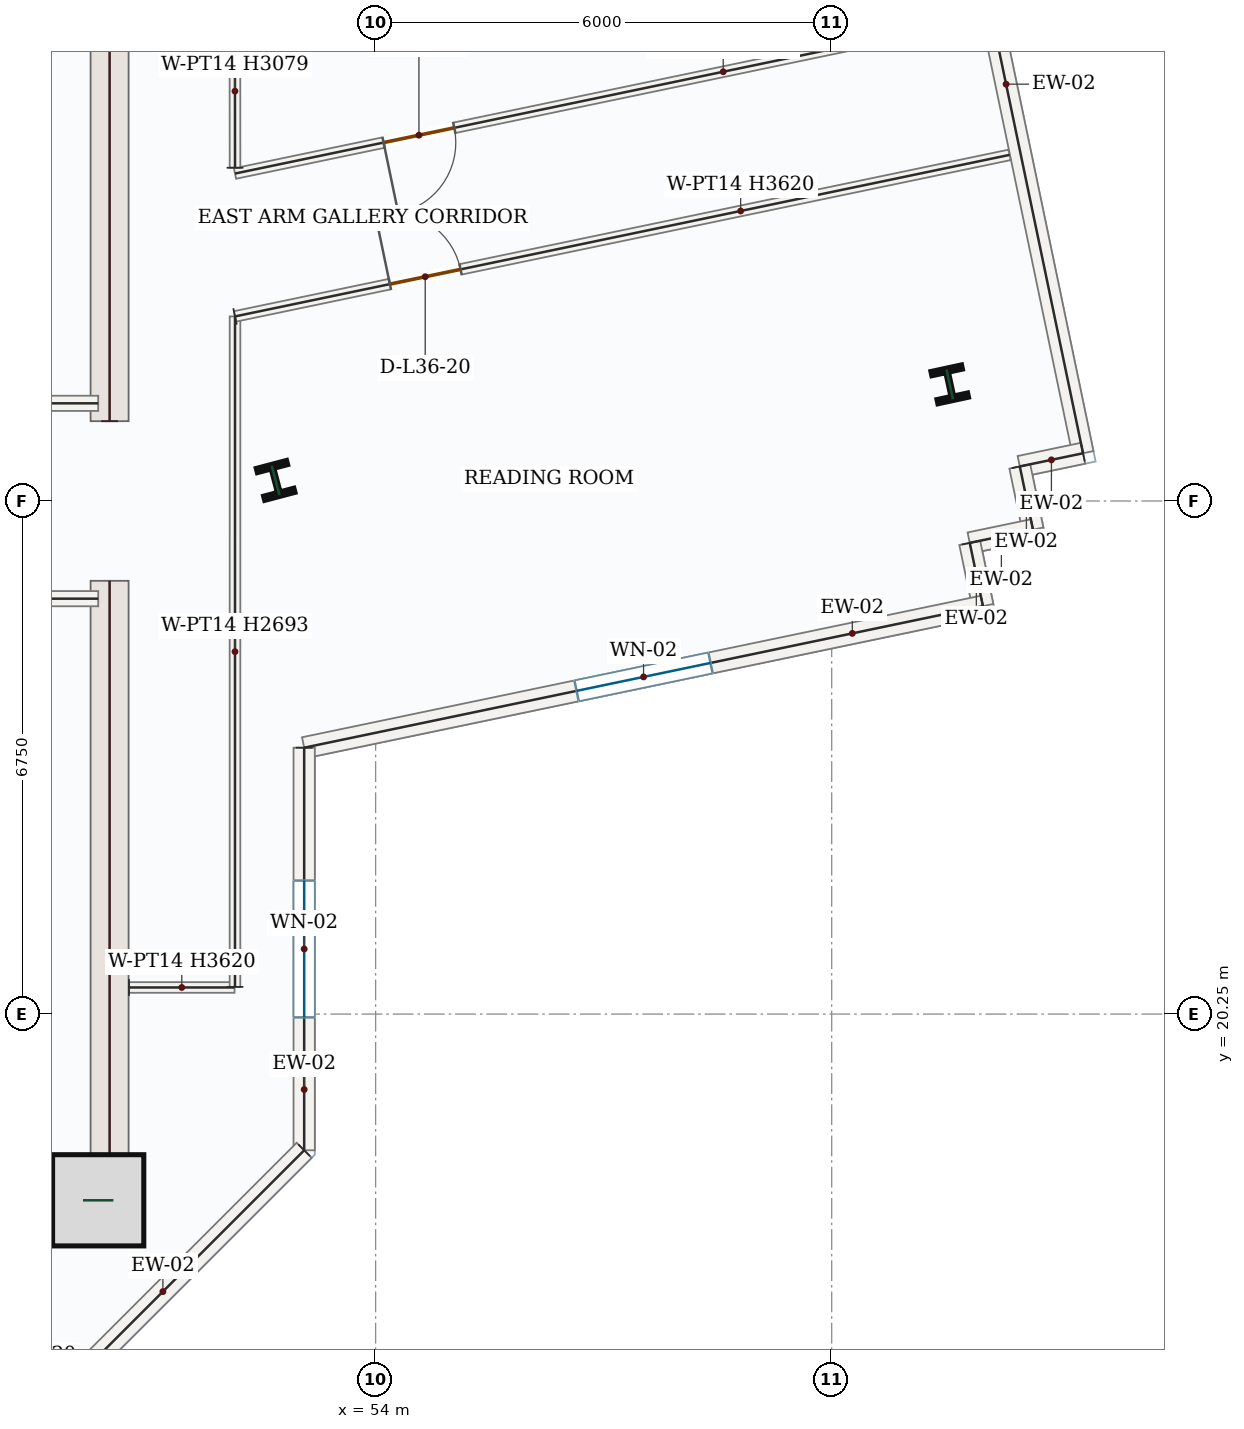
"""IFC4 building model, lengths in metres.
Left out: names, types, materials, properties, quantities, classifications, styles, units other than length and angle.
Written with IfcOpenShell. Run it as: python <this file> out.ifc"""

import sys

from ifc_helpers import new_model, si_unit, direction, frame, frame_2d, origin, origin_2d, place, context, subcontext, project, spatial, rectangle, i_section, extrude, source, transform, mapped, element, fill, save


model = new_model("IFC4")
c1 = context("Model", 3, precision=1e-05, world=origin(), true_north=direction((0.0, 1.0)))
c2 = subcontext(c1, "Body", "Model", "MODEL_VIEW")
j1 = project(units=[si_unit("LENGTHUNIT", "METRE"), si_unit("PLANEANGLEUNIT", "RADIAN")], contexts=[c1])
p1 = place(None, origin())
s1 = spatial("IfcSite", under=j1, at=p1, CompositionType="ELEMENT")
p2 = place(p1, origin())
s2 = spatial("IfcBuilding", under=s1, at=p2, CompositionType="ELEMENT")
p3 = place(p2, frame((0.0, 0.0, 159.0)))
s3 = spatial("IfcBuildingStorey", under=s2, at=p3, CompositionType="ELEMENT", Elevation=159.0)
m1 = source(origin(), c2, "Body", "SweptSolid", [
    extrude(rectangle(XDim=8.55, YDim=0.5, at=frame_2d((4.275, 0.0))), origin(), (0.0, 0.0, 1.0), 3.62),
])
for number, where, z_axis, x_axis in (
    (1, (50.5, 17.4, 0.0), (0.0, 0.0, 1.0), (0.0, 1.0, 0.0)),
    (2, (50.5, 28.05, 0.0), (0.0, 0.0, 1.0), (0.0, 1.0, 0.0)),
):
    element("IfcWall", number, at=place(p3, frame(where, z_axis=z_axis, x_axis=x_axis)), inside=s3, PredefinedType="SHEAR", context=c2, shape_type="MappedRepresentation", body=[
        mapped(m1, transform((0.0, 0.0, 0.0), x_axis=(1.0, 0.0, 0.0), y_axis=(0.0, 1.0, 0.0), z_axis=(0.0, 0.0, 1.0), scale=1.0)),
    ])
m2 = source(origin(), c2, "Body", "SweptSolid", [
    extrude(rectangle(XDim=7.0, YDim=0.5, at=frame_2d((3.5, 0.0))), origin(), (0.0, 0.0, 1.0), 3.62),
])
p4 = place(p3, frame((43.25, 17.65, 0.0), z_axis=(0.0, 0.0, 1.0), x_axis=(1.0, 0.0, 0.0)))
e3 = element("IfcWall", 3, at=p4, inside=s3, PredefinedType="SHEAR", context=c2, shape_type="MappedRepresentation", body=[
    mapped(m2, transform((0.0, 0.0, 0.0), x_axis=(1.0, 0.0, 0.0), y_axis=(0.0, 1.0, 0.0), z_axis=(0.0, 0.0, 1.0), scale=1.0)),
])
m3 = source(origin(), c2, "Body", "SweptSolid", [
    extrude(rectangle(XDim=1.2, YDim=1.2, at=origin_2d()), origin(), (0.0, 0.0, 1.0), 3.9),
])
p5 = place(p3, frame((50.35, 17.8, 0.0), z_axis=(0.0, 0.0, 1.0), x_axis=(1.0, 0.0, 0.0)))
e4 = element("IfcColumn", 4, at=p5, inside=s3, PredefinedType="COLUMN", context=c2, shape_type="MappedRepresentation", body=[
    mapped(m3, transform((0.0, 0.0, 0.0), x_axis=(1.0, 0.0, 0.0), y_axis=(0.0, 1.0, 0.0), z_axis=(0.0, 0.0, 1.0), scale=1.0)),
])
m4 = source(origin(), c2, "Body", "SweptSolid", [
    extrude(i_section(OverallWidth=0.412, OverallDepth=0.435, WebThickness=0.036, FlangeThickness=0.057, FilletRadius=0.018, at=origin_2d()), origin(), (0.0, 0.0, 1.0), 3.9),
])
for number, where, z_axis, x_axis in (
    (5, (52.684, 27.271, 0.0), (0.0, 0.0, 1.0), (0.967, 0.255, 0.0)),
    (6, (61.553, 28.535, 0.0), (0.0, 0.0, 1.0), (0.977, 0.211, 0.0)),
):
    element("IfcColumn", number, at=place(p3, frame(where, z_axis=z_axis, x_axis=x_axis)), inside=s3, PredefinedType="COLUMN", context=c2, shape_type="MappedRepresentation", body=[
        mapped(m4, transform((0.0, 0.0, 0.0), x_axis=(1.0, 0.0, 0.0), y_axis=(0.0, 1.0, 0.0), z_axis=(0.0, 0.0, 1.0), scale=1.0)),
    ])
m5 = source(origin(), c2, "Body", "SweptSolid", [
    extrude(rectangle(XDim=9.92, YDim=0.28, at=frame_2d((4.96, 0.0))), origin(), (0.0, 0.0, 1.0), 3.62),
])
p6 = place(p3, frame((61.282, 37.339, 0.0), z_axis=(0.0, 0.0, 1.0), x_axis=(0.204150812873, -0.978939449406, 0.0)))
e7 = element("IfcWall", 7, at=p6, inside=s3, PredefinedType="SOLIDWALL", context=c2, shape_type="MappedRepresentation", body=[
    mapped(m5, transform((0.0, 0.0, 0.0), x_axis=(1.0, 0.0, 0.0), y_axis=(0.0, 1.0, 0.0), z_axis=(0.0, 0.0, 1.0), scale=1.0)),
])
m6 = source(origin(), c2, "Body", "SweptSolid", [
    extrude(rectangle(XDim=0.85, YDim=0.28, at=frame_2d((0.425, 0.0))), origin(), (0.0, 0.0, 1.0), 3.62),
])
for number, where, z_axis, x_axis in (
    (8, (63.307, 27.628, 0.0), (0.0, 0.0, 1.0), (-0.979, -0.204, 0.0)),
    (9, (62.475, 27.455, 0.0), (0.0, 0.0, 1.0), (0.204, -0.979, 0.0)),
    (10, (62.648, 26.623, 0.0), (0.0, 0.0, 1.0), (-0.979, -0.204, 0.0)),
):
    element("IfcWall", number, at=place(p3, frame(where, z_axis=z_axis, x_axis=x_axis)), inside=s3, PredefinedType="SOLIDWALL", context=c2, shape_type="MappedRepresentation", body=[
        mapped(m6, transform((0.0, 0.0, 0.0), x_axis=(1.0, 0.0, 0.0), y_axis=(0.0, 1.0, 0.0), z_axis=(0.0, 0.0, 1.0), scale=1.0)),
    ])
m7 = source(origin(), c2, "Body", "SweptSolid", [
    extrude(rectangle(XDim=0.85, YDim=0.28, at=frame_2d((0.425, 0.0))), origin(), (0.0, 0.0, 1.0), 3.62),
])
p7 = place(p3, frame((61.816, 26.449, 0.0), z_axis=(0.0, 0.0, 1.0), x_axis=(0.203896913579, -0.97899236393, 0.0)))
e11 = element("IfcWall", 11, at=p7, inside=s3, PredefinedType="SOLIDWALL", context=c2, shape_type="MappedRepresentation", body=[
    mapped(m7, transform((0.0, 0.0, 0.0), x_axis=(1.0, 0.0, 0.0), y_axis=(0.0, 1.0, 0.0), z_axis=(0.0, 0.0, 1.0), scale=1.0)),
])
p8 = place(p3, frame((61.99, 25.617, 0.0), z_axis=(0.0, 0.0, 1.0), x_axis=(-0.978937646314, -0.204159458828, 0.0)))
e12 = element("IfcWall", 12, at=p8, inside=s3, PredefinedType="SOLIDWALL", context=c2, shape_type="SweptSolid", body=[
    extrude(rectangle(XDim=9.122, YDim=0.28, at=frame_2d((4.561, 0.0))), origin(), (0.0, 0.0, 1.0), 3.62),
])
p9 = place(p8, frame((3.661, 0.0, 0.85)))
e13 = element("IfcOpeningElement", 13, at=p9, cuts=e12, PredefinedType="OPENING", context=c2, shape_type="SweptSolid", body=[
    extrude(rectangle(XDim=1.8, YDim=1.75, at=frame_2d((0.9, 0.875))), frame((0.0, 0.15, 0.0), z_axis=(0.0, -1.0, 0.0), x_axis=(1.0, 0.0, 0.0)), (0.0, 0.0, 1.0), 0.3),
])
p10 = place(p3, frame((53.06, 23.754, 0.0), z_axis=(0.0, 0.0, 1.0), x_axis=(0.0, -1.0, 0.0)))
e14 = element("IfcWall", 14, at=p10, inside=s3, PredefinedType="SOLIDWALL", context=c2, shape_type="SweptSolid", body=[
    extrude(rectangle(XDim=5.296, YDim=0.28, at=frame_2d((2.648, 0.0))), origin(), (0.0, 0.0, 1.0), 3.62),
])
p11 = place(p10, frame((1.748, 0.0, 0.85)))
e15 = element("IfcOpeningElement", 15, at=p11, cuts=e14, PredefinedType="OPENING", context=c2, shape_type="SweptSolid", body=[
    extrude(rectangle(XDim=1.8, YDim=1.75, at=frame_2d((0.9, 0.875))), frame((0.0, 0.15, 0.0), z_axis=(0.0, -1.0, 0.0), x_axis=(1.0, 0.0, 0.0)), (0.0, 0.0, 1.0), 0.3),
])
m8 = source(origin(), c2, "Body", "SweptSolid", [
    extrude(rectangle(XDim=5.258, YDim=0.28, at=frame_2d((2.629, 0.0))), origin(), (0.0, 0.0, 1.0), 3.62),
])
p12 = place(p3, frame((53.06, 18.458, 0.0), z_axis=(0.0, 0.0, 1.0), x_axis=(-0.707106781187, -0.707106781187, 0.0)))
e16 = element("IfcWall", 16, at=p12, inside=s3, PredefinedType="SOLIDWALL", context=c2, shape_type="MappedRepresentation", body=[
    mapped(m8, transform((0.0, 0.0, 0.0), x_axis=(1.0, 0.0, 0.0), y_axis=(0.0, 1.0, 0.0), z_axis=(0.0, 0.0, 1.0), scale=1.0)),
])
m9 = source(origin(), c2, "Body", "SweptSolid", [
    extrude(rectangle(XDim=4.25, YDim=0.2, at=frame_2d((2.125, 0.0))), origin(), (0.0, 0.0, 1.0), 3.62),
])
for number, where, z_axis, x_axis in (
    (17, (46.1, 25.715, 0.0), (0.0, 0.0, 1.0), (1.0, 0.0, 0.0)),
    (18, (46.1, 28.285, 0.0), (0.0, 0.0, 1.0), (1.0, 0.0, 0.0)),
):
    element("IfcWall", number, at=place(p3, frame(where, z_axis=z_axis, x_axis=x_axis)), inside=s3, PredefinedType="SOLIDWALL", context=c2, shape_type="MappedRepresentation", body=[
        mapped(m9, transform((0.0, 0.0, 0.0), x_axis=(1.0, 0.0, 0.0), y_axis=(0.0, 1.0, 0.0), z_axis=(0.0, 0.0, 1.0), scale=1.0)),
    ])
m10 = source(origin(), c2, "Body", "SweptSolid", [
    extrude(rectangle(XDim=1.389, YDim=0.14, at=frame_2d((0.695, 0.0))), origin(), (0.0, 0.0, 1.0), 3.62),
])
p13 = place(p3, frame((50.755, 20.6, 0.0), z_axis=(0.0, 0.0, 1.0), x_axis=(1.0, 0.0, 0.0)))
e19 = element("IfcWall", 19, at=p13, inside=s3, PredefinedType="PARTITIONING", context=c2, shape_type="MappedRepresentation", body=[
    mapped(m10, transform((0.0, 0.0, 0.0), x_axis=(1.0, 0.0, 0.0), y_axis=(0.0, 1.0, 0.0), z_axis=(0.0, 0.0, 1.0), scale=1.0)),
])
m11 = source(origin(), c2, "Body", "SweptSolid", [
    extrude(rectangle(XDim=8.821, YDim=0.14, at=frame_2d((4.41, 0.0))), origin(), (0.0, 0.0, 1.0), 2.693),
])
p14 = place(p3, frame((52.15, 20.608, 0.0), z_axis=(0.0, 0.0, 1.0), x_axis=(2.7678596e-05, 0.999999999617, 0.0)))
e20 = element("IfcWall", 20, at=p14, inside=s3, PredefinedType="PARTITIONING", context=c2, shape_type="MappedRepresentation", body=[
    mapped(m11, transform((0.0, 0.0, 0.0), x_axis=(1.0, 0.0, 0.0), y_axis=(0.0, 1.0, 0.0), z_axis=(0.0, 0.0, 1.0), scale=1.0)),
])
p15 = place(p3, frame((52.15, 29.428, 0.0), z_axis=(0.0, 0.0, 1.0), x_axis=(0.978935516763, 0.204169669688, 0.0)))
e21 = element("IfcWall", 21, at=p15, inside=s3, PredefinedType="PARTITIONING", context=c2, shape_type="SweptSolid", body=[
    extrude(rectangle(XDim=10.409, YDim=0.14, at=frame_2d((5.205, 0.0))), origin(), (0.0, 0.0, 1.0), 3.62),
])
p16 = place(p15, frame((2.081, 0.0, 0.0)))
e22 = element("IfcOpeningElement", 22, at=p16, cuts=e21, PredefinedType="OPENING", context=c2, shape_type="SweptSolid", body=[
    extrude(rectangle(XDim=0.95, YDim=2.15, at=frame_2d((0.475, 1.075))), frame((0.0, 0.08, 0.0), z_axis=(0.0, -1.0, 0.0), x_axis=(1.0, 0.0, 0.0)), (0.0, 0.0, 1.0), 0.16),
])
p17 = place(p3, frame((61.965, 33.354, 0.0), z_axis=(0.0, 0.0, 1.0), x_axis=(-0.978942518705, -0.204136094483, 0.0)))
e23 = element("IfcWall", 23, at=p17, inside=s3, PredefinedType="PARTITIONING", context=c2, shape_type="SweptSolid", body=[
    extrude(rectangle(XDim=10.026, YDim=0.14, at=frame_2d((5.013, 0.0))), origin(), (0.0, 0.0, 1.0), 3.62),
])
p18 = place(p17, frame((7.079, 0.0, 0.0)))
e24 = element("IfcOpeningElement", 24, at=p18, cuts=e23, PredefinedType="OPENING", context=c2, shape_type="SweptSolid", body=[
    extrude(rectangle(XDim=0.95, YDim=2.15, at=frame_2d((0.475, 1.075))), frame((0.0, 0.08, 0.0), z_axis=(0.0, -1.0, 0.0), x_axis=(1.0, 0.0, 0.0)), (0.0, 0.0, 1.0), 0.16),
])
m12 = source(origin(), c2, "Body", "SweptSolid", [
    extrude(rectangle(XDim=2.014, YDim=0.14, at=frame_2d((1.007, 0.0))), origin(), (0.0, 0.0, 1.0), 3.079),
])
p19 = place(p3, frame((52.15, 31.385, 0.0), z_axis=(0.0, 0.0, 1.0), x_axis=(-0.000484789665, 0.999999882489, 0.0)))
e25 = element("IfcWall", 25, at=p19, inside=s3, PredefinedType="PARTITIONING", context=c2, shape_type="MappedRepresentation", body=[
    mapped(m12, transform((0.0, 0.0, 0.0), x_axis=(1.0, 0.0, 0.0), y_axis=(0.0, 1.0, 0.0), z_axis=(0.0, 0.0, 1.0), scale=1.0)),
])
m13 = source(origin(), c2, "Body", "SweptSolid", [
    extrude(rectangle(XDim=1.8, YDim=1.75, at=frame_2d((0.9, 0.875))), frame((0.0, 0.03, 0.0), z_axis=(0.0, -1.0, 0.0), x_axis=(1.0, 0.0, 0.0)), (0.0, 0.0, 1.0), 0.06),
])
p20 = place(p9, origin())
e26 = element("IfcWindow", 26, at=p20, inside=s3, PartitioningType="DOUBLE_PANEL_VERTICAL", PredefinedType="WINDOW", context=c2, shape_type="MappedRepresentation", body=[
    mapped(m13, transform((0.0, 0.0, 0.0), x_axis=(1.0, 0.0, 0.0), y_axis=(0.0, 1.0, 0.0), z_axis=(0.0, 0.0, 1.0), scale=1.0)),
])
fill(e13, e26)
p21 = place(p11, origin())
e27 = element("IfcWindow", 27, at=p21, inside=s3, PartitioningType="DOUBLE_PANEL_VERTICAL", PredefinedType="WINDOW", context=c2, shape_type="MappedRepresentation", body=[
    mapped(m13, transform((0.0, 0.0, 0.0), x_axis=(1.0, 0.0, 0.0), y_axis=(0.0, 1.0, 0.0), z_axis=(0.0, 0.0, 1.0), scale=1.0)),
])
fill(e15, e27)
m14 = source(origin(), c2, "Body", "SweptSolid", [
    extrude(rectangle(XDim=0.95, YDim=2.15, at=frame_2d((0.475, 1.075))), frame((0.0, 0.025, 0.0), z_axis=(0.0, -1.0, 0.0), x_axis=(1.0, 0.0, 0.0)), (0.0, 0.0, 1.0), 0.05),
])
p22 = place(p16, origin())
e28 = element("IfcDoor", 28, at=p22, inside=s3, OperationType="SINGLE_SWING_LEFT", PredefinedType="DOOR", context=c2, shape_type="MappedRepresentation", body=[
    mapped(m14, transform((0.0, 0.0, 0.0), x_axis=(1.0, 0.0, 0.0), y_axis=(0.0, 1.0, 0.0), z_axis=(0.0, 0.0, 1.0), scale=1.0)),
])
fill(e22, e28)
p23 = place(p18, origin())
e29 = element("IfcDoor", 29, at=p23, inside=s3, OperationType="SINGLE_SWING_RIGHT", PredefinedType="DOOR", context=c2, shape_type="MappedRepresentation", body=[
    mapped(m14, transform((0.0, 0.0, 0.0), x_axis=(1.0, 0.0, 0.0), y_axis=(0.0, 1.0, 0.0), z_axis=(0.0, 0.0, 1.0), scale=1.0)),
])
fill(e24, e29)
save(model, sys.argv[1])
